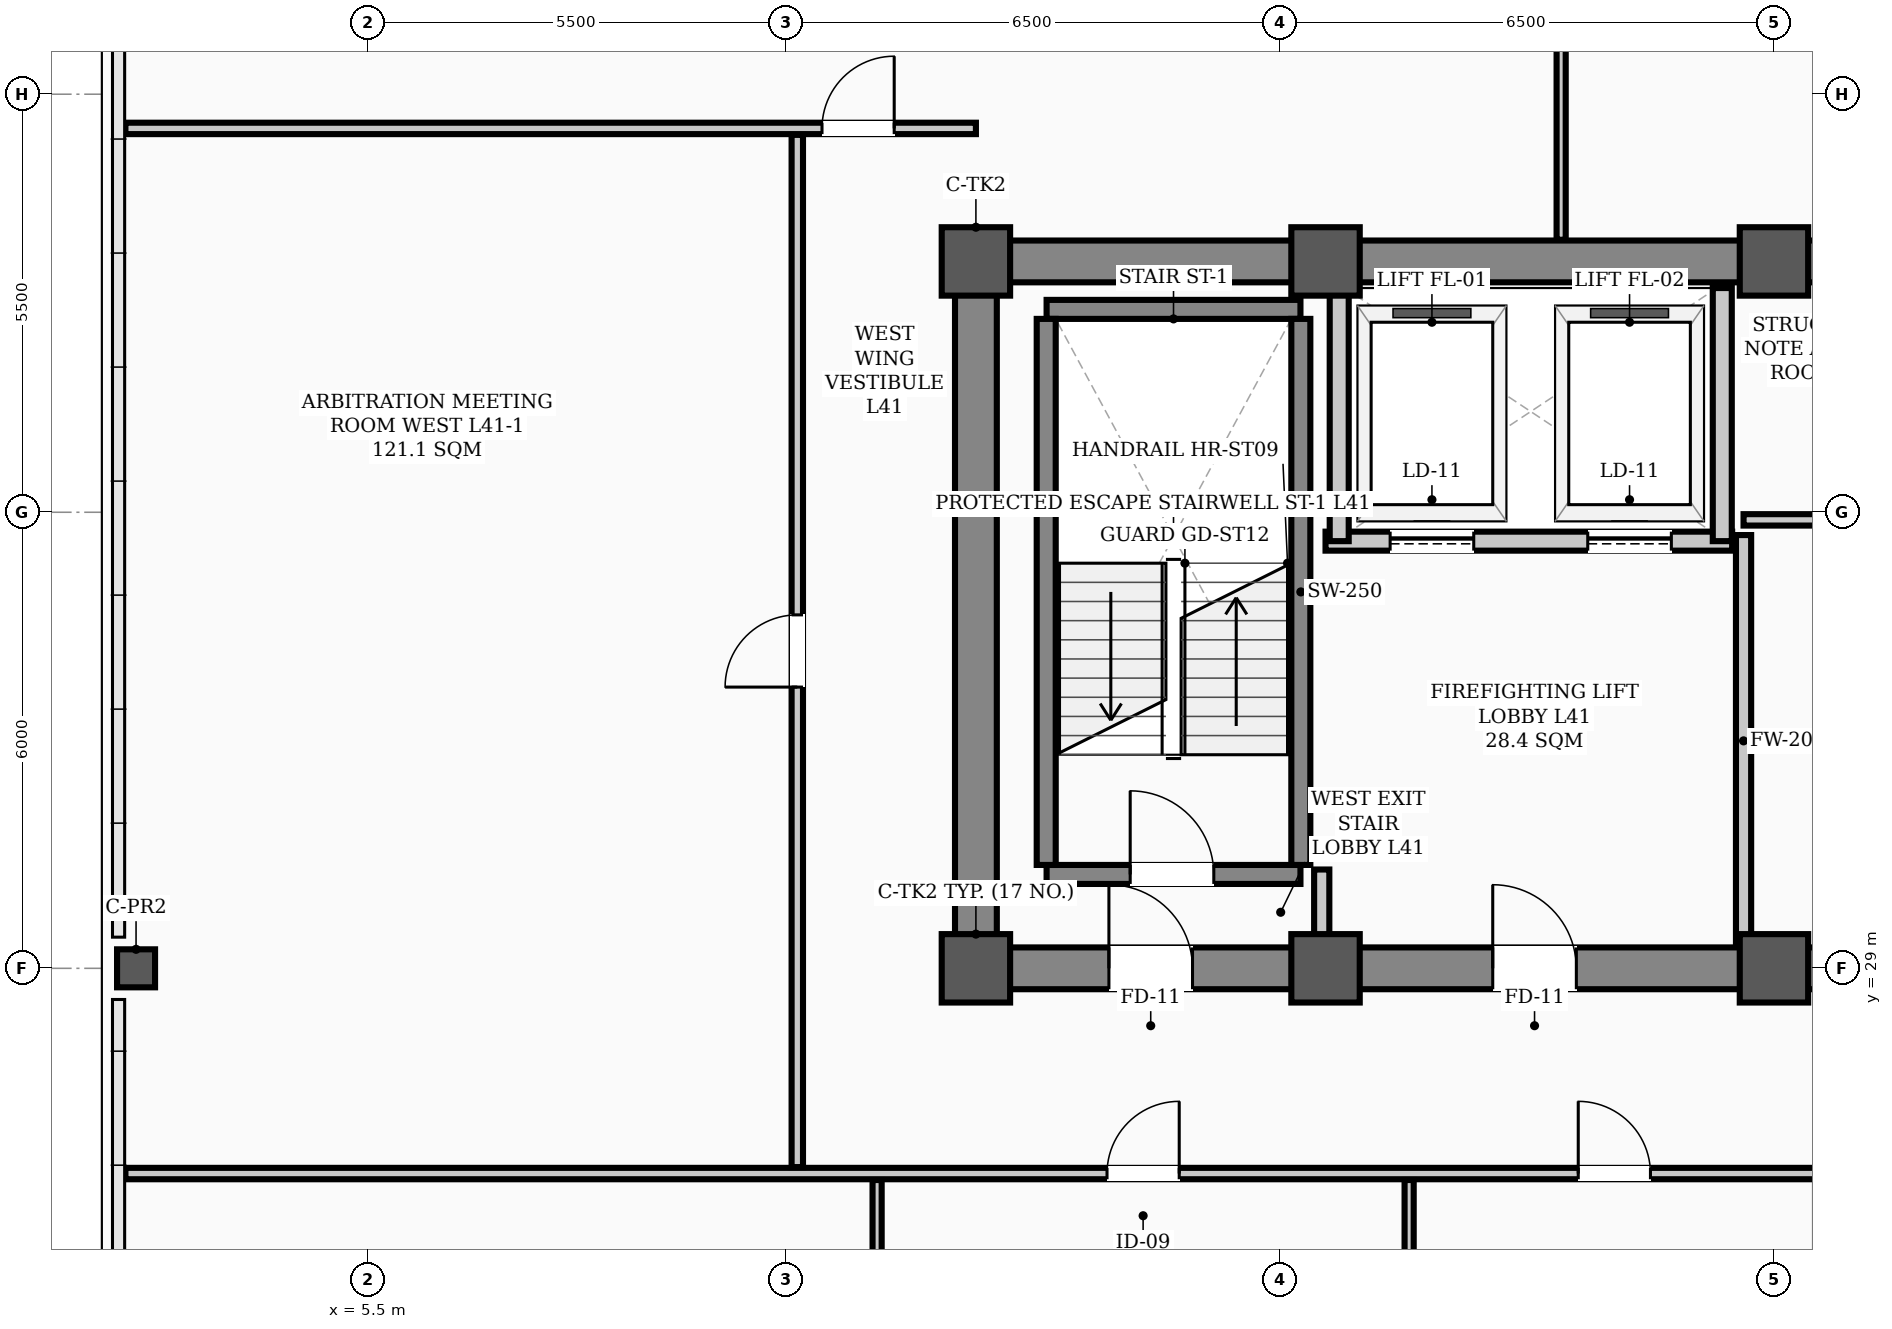
"""IFC4 building model, lengths in metres.
Left out: names, types, materials, properties, quantities, classifications, styles, units other than length and angle.
Written with IfcOpenShell. Run it as: python <this file> out.ifc"""

import sys

from ifc_helpers import new_model, si_unit, direction, frame, frame_2d, origin, origin_2d, place, context, subcontext, project, spatial, rectangle, hollow_rectangle, extrude, element, fill, save


model = new_model("IFC4")
c1 = context("Model", 3, precision=1e-05, world=origin(), true_north=direction((0.0, 1.0)))
c2 = subcontext(c1, "Body", "Model", "MODEL_VIEW")
j1 = project(units=[si_unit("LENGTHUNIT", "METRE"), si_unit("PLANEANGLEUNIT", "RADIAN")], contexts=[c1])
p1 = place(None, origin())
s1 = spatial("IfcSite", under=j1, at=p1, CompositionType="ELEMENT")
p2 = place(p1, origin())
s2 = spatial("IfcBuilding", under=s1, at=p2, CompositionType="ELEMENT")
p3 = place(p2, frame((0.0, 0.0, 165.6)))
s3 = spatial("IfcBuildingStorey", under=s2, at=p3, CompositionType="ELEMENT", Elevation=165.6)
for number, where, z_axis, x_axis in (
    (1, (13.5, 29.0, 0.0), (0.0, 0.0, 1.0), (1.0, 0.0, 0.0)),
    (2, (13.5, 38.3, 0.0), (0.0, 0.0, 1.0), (1.0, 0.0, 0.0)),
    (3, (18.1, 29.0, 0.0), (0.0, 0.0, 1.0), (1.0, 0.0, 0.0)),
    (4, (18.1, 38.3, 0.0), (0.0, 0.0, 1.0), (1.0, 0.0, 0.0)),
    (5, (24.0, 29.0, 0.0), (0.0, 0.0, 1.0), (1.0, 0.0, 0.0)),
    (6, (24.0, 38.3, 0.0), (0.0, 0.0, 1.0), (1.0, 0.0, 0.0)),
):
    element("IfcColumn", number, at=place(p3, frame(where, z_axis=z_axis, x_axis=x_axis)), inside=s3, PredefinedType="COLUMN", context=c2, shape_type="SweptSolid", body=[
        extrude(hollow_rectangle(XDim=0.9, YDim=0.9, WallThickness=0.035, InnerFilletRadius=0.017, OuterFilletRadius=0.052, at=origin_2d()), origin(), (0.0, 0.0, 1.0), 3.9),
    ])
p4 = place(p3, frame((2.45, 29.0, 0.0), z_axis=(0.0, 0.0, 1.0), x_axis=(1.0, 0.0, 0.0)))
e7 = element("IfcColumn", 7, at=p4, inside=s3, PredefinedType="COLUMN", context=c2, shape_type="SweptSolid", body=[
    extrude(hollow_rectangle(XDim=0.5, YDim=0.5, WallThickness=0.024, InnerFilletRadius=0.012, OuterFilletRadius=0.036, at=origin_2d()), origin(), (0.0, 0.0, 1.0), 3.66),
])
p5 = place(p3, frame((13.5, 29.0, 0.0), z_axis=(0.0, 0.0, 1.0), x_axis=(1.0, 0.0, 0.0)))
e8 = element("IfcWall", 8, at=p5, inside=s3, PredefinedType="SHEAR", context=c2, shape_type="SweptSolid", body=[
    extrude(rectangle(XDim=30.5, YDim=0.55, at=frame_2d((15.25, 0.0))), origin(), (0.0, 0.0, 1.0), 3.66),
])
p6 = place(p5, frame((1.75, 0.0, 0.0)))
e9 = element("IfcOpeningElement", 9, at=p6, cuts=e8, PredefinedType="OPENING", context=c2, shape_type="SweptSolid", body=[
    extrude(rectangle(XDim=1.1, YDim=2.08, at=frame_2d((0.55, 1.04))), frame((0.0, 0.285, 0.0), z_axis=(0.0, -1.0, 0.0), x_axis=(1.0, 0.0, 0.0)), (0.0, 0.0, 1.0), 0.57),
])
p7 = place(p5, frame((26.7, 0.0, 0.0)))
e10 = element("IfcOpeningElement", 10, at=p7, cuts=e8, PredefinedType="OPENING", context=c2, shape_type="SweptSolid", body=[
    extrude(rectangle(XDim=1.1, YDim=2.08, at=frame_2d((0.55, 1.04))), frame((0.0, 0.285, 0.0), z_axis=(0.0, -1.0, 0.0), x_axis=(1.0, 0.0, 0.0)), (0.0, 0.0, 1.0), 0.57),
])
p8 = place(p5, frame((6.8, 0.0, 0.0)))
e11 = element("IfcOpeningElement", 11, at=p8, cuts=e8, PredefinedType="OPENING", context=c2, shape_type="SweptSolid", body=[
    extrude(rectangle(XDim=1.1, YDim=2.08, at=frame_2d((0.55, 1.04))), frame((0.0, 0.285, 0.0), z_axis=(0.0, -1.0, 0.0), x_axis=(1.0, 0.0, 0.0)), (0.0, 0.0, 1.0), 0.57),
])
p9 = place(p5, frame((13.2, 0.0, 0.0)))
e12 = element("IfcOpeningElement", 12, at=p9, cuts=e8, PredefinedType="OPENING", context=c2, shape_type="SweptSolid", body=[
    extrude(rectangle(XDim=1.6, YDim=2.08, at=frame_2d((0.8, 1.04))), frame((0.0, 0.285, 0.0), z_axis=(0.0, -1.0, 0.0), x_axis=(1.0, 0.0, 0.0)), (0.0, 0.0, 1.0), 0.57),
])
p10 = place(p5, frame((19.5, 0.0, 0.0)))
e13 = element("IfcOpeningElement", 13, at=p10, cuts=e8, PredefinedType="OPENING", context=c2, shape_type="SweptSolid", body=[
    extrude(rectangle(XDim=0.9, YDim=2.08, at=frame_2d((0.45, 1.04))), frame((0.0, 0.285, 0.0), z_axis=(0.0, -1.0, 0.0), x_axis=(1.0, 0.0, 0.0)), (0.0, 0.0, 1.0), 0.57),
])
p11 = place(p5, frame((21.55, 0.0, 0.0)))
e14 = element("IfcOpeningElement", 14, at=p11, cuts=e8, PredefinedType="OPENING", context=c2, shape_type="SweptSolid", body=[
    extrude(rectangle(XDim=0.9, YDim=2.08, at=frame_2d((0.45, 1.04))), frame((0.0, 0.285, 0.0), z_axis=(0.0, -1.0, 0.0), x_axis=(1.0, 0.0, 0.0)), (0.0, 0.0, 1.0), 0.57),
])
p12 = place(p3, frame((13.5, 38.3, 0.0), z_axis=(0.0, 0.0, 1.0), x_axis=(1.0, 0.0, 0.0)))
e15 = element("IfcWall", 15, at=p12, inside=s3, PredefinedType="SHEAR", context=c2, shape_type="SweptSolid", body=[
    extrude(rectangle(XDim=30.5, YDim=0.55, at=frame_2d((15.25, 0.0))), origin(), (0.0, 0.0, 1.0), 3.66),
])
p13 = place(p3, frame((13.5, 29.35, 0.0), z_axis=(0.0, 0.0, 1.0), x_axis=(0.0, 1.0, 0.0)))
e16 = element("IfcWall", 16, at=p13, inside=s3, PredefinedType="SHEAR", context=c2, shape_type="SweptSolid", body=[
    extrude(rectangle(XDim=8.6, YDim=0.55, at=frame_2d((4.3, 0.0))), origin(), (0.0, 0.0, 1.0), 3.66),
])
p14 = place(p3, frame((14.43, 30.235, 0.0), z_axis=(0.0, 0.0, 1.0), x_axis=(1.0, 0.0, 0.0)))
e17 = element("IfcWall", 17, at=p14, inside=s3, PredefinedType="STANDARD", context=c2, shape_type="SweptSolid", body=[
    extrude(rectangle(XDim=3.34, YDim=0.25, at=frame_2d((1.67, 0.0))), origin(), (0.0, 0.0, 1.0), 3.66),
])
p15 = place(p14, frame((1.1, 0.0, 0.0)))
e18 = element("IfcOpeningElement", 18, at=p15, cuts=e17, PredefinedType="OPENING", context=c2, shape_type="SweptSolid", body=[
    extrude(rectangle(XDim=1.1, YDim=2.08, at=frame_2d((0.55, 1.04))), frame((0.0, 0.135, 0.0), z_axis=(0.0, -1.0, 0.0), x_axis=(1.0, 0.0, 0.0)), (0.0, 0.0, 1.0), 0.27),
])
p16 = place(p3, frame((14.43, 37.669, 0.0), z_axis=(0.0, 0.0, 1.0), x_axis=(1.0, 0.0, 0.0)))
e19 = element("IfcWall", 19, at=p16, inside=s3, PredefinedType="STANDARD", context=c2, shape_type="SweptSolid", body=[
    extrude(rectangle(XDim=3.34, YDim=0.25, at=frame_2d((1.67, 0.0))), origin(), (0.0, 0.0, 1.0), 3.66),
])
for number, where, z_axis, x_axis in (
    (20, (14.425, 30.36, 0.0), (0.0, 0.0, 1.0), (0.0, 1.0, 0.0)),
    (21, (17.775, 30.36, 0.0), (0.0, 0.0, 1.0), (0.0, 1.0, 0.0)),
):
    element("IfcWall", number, at=place(p3, frame(where, z_axis=z_axis, x_axis=x_axis)), inside=s3, PredefinedType="STANDARD", context=c2, shape_type="SweptSolid", body=[
        extrude(rectangle(XDim=7.184, YDim=0.25, at=frame_2d((3.592, 0.0))), origin(), (0.0, 0.0, 1.0), 3.66),
    ])
p17 = place(p3, frame((18.1, 34.62, 0.0), z_axis=(0.0, 0.0, 1.0), x_axis=(1.0, 0.0, 0.0)))
e22 = element("IfcWall", 22, at=p17, inside=s3, PredefinedType="STANDARD", context=c2, shape_type="SweptSolid", body=[
    extrude(rectangle(XDim=5.35, YDim=0.25, at=frame_2d((2.675, 0.0))), origin(), (0.0, 0.0, 1.0), 3.66),
])
p18 = place(p17, frame((0.85, 0.0, 0.0)))
e23 = element("IfcOpeningElement", 23, at=p18, cuts=e22, PredefinedType="OPENING", context=c2, shape_type="SweptSolid", body=[
    extrude(rectangle(XDim=1.1, YDim=2.08, at=frame_2d((0.55, 1.04))), frame((0.0, 0.135, 0.0), z_axis=(0.0, -1.0, 0.0), x_axis=(1.0, 0.0, 0.0)), (0.0, 0.0, 1.0), 0.27),
])
p19 = place(p17, frame((3.45, 0.0, 0.0)))
e24 = element("IfcOpeningElement", 24, at=p19, cuts=e22, PredefinedType="OPENING", context=c2, shape_type="SweptSolid", body=[
    extrude(rectangle(XDim=1.1, YDim=2.08, at=frame_2d((0.55, 1.04))), frame((0.0, 0.135, 0.0), z_axis=(0.0, -1.0, 0.0), x_axis=(1.0, 0.0, 0.0)), (0.0, 0.0, 1.0), 0.27),
])
for number, where, z_axis, x_axis in (
    (25, (18.28, 34.62, 0.0), (0.0, 0.0, 1.0), (0.0, 1.0, 0.0)),
    (26, (23.32, 34.62, 0.0), (0.0, 0.0, 1.0), (0.0, 1.0, 0.0)),
):
    element("IfcWall", number, at=place(p3, frame(where, z_axis=z_axis, x_axis=x_axis)), inside=s3, PredefinedType="STANDARD", context=c2, shape_type="SweptSolid", body=[
        extrude(rectangle(XDim=3.33, YDim=0.25, at=frame_2d((1.665, 0.0))), origin(), (0.0, 0.0, 1.0), 2.24),
    ])
p20 = place(p3, frame((23.6, 34.9, 0.0), z_axis=(0.0, 0.0, 1.0), x_axis=(1.0, 0.0, 0.0)))
e27 = element("IfcWall", 27, at=p20, inside=s3, PredefinedType="PARTITIONING", context=c2, shape_type="SweptSolid", body=[
    extrude(rectangle(XDim=4.58, YDim=0.15, at=frame_2d((2.29, 0.0))), origin(), (0.0, 0.0, 1.0), 3.66),
])
p21 = place(p20, frame((1.875, 0.0, 0.0)))
e28 = element("IfcOpeningElement", 28, at=p21, cuts=e27, PredefinedType="OPENING", context=c2, shape_type="SweptSolid", body=[
    extrude(rectangle(XDim=0.95, YDim=2.08, at=frame_2d((0.475, 1.04))), frame((0.0, 0.085, 0.0), z_axis=(0.0, -1.0, 0.0), x_axis=(1.0, 0.0, 0.0)), (0.0, 0.0, 1.0), 0.17),
])
p22 = place(p3, frame((2.31, 26.3, 0.0), z_axis=(0.0, 0.0, 1.0), x_axis=(1.0, 0.0, 0.0)))
e29 = element("IfcWall", 29, at=p22, inside=s3, PredefinedType="PARTITIONING", context=c2, shape_type="SweptSolid", body=[
    extrude(rectangle(XDim=46.38, YDim=0.15, at=frame_2d((23.19, 0.0))), origin(), (0.0, 0.0, 1.0), 2.24),
])
p23 = place(p22, frame((12.915, 0.0, 0.0)))
e30 = element("IfcOpeningElement", 30, at=p23, cuts=e29, PredefinedType="OPENING", context=c2, shape_type="SweptSolid", body=[
    extrude(rectangle(XDim=0.95, YDim=2.08, at=frame_2d((0.475, 1.04))), frame((0.0, 0.085, 0.0), z_axis=(0.0, -1.0, 0.0), x_axis=(1.0, 0.0, 0.0)), (0.0, 0.0, 1.0), 0.17),
])
p24 = place(p22, frame((19.115, 0.0, 0.0)))
e31 = element("IfcOpeningElement", 31, at=p24, cuts=e29, PredefinedType="OPENING", context=c2, shape_type="SweptSolid", body=[
    extrude(rectangle(XDim=0.95, YDim=2.08, at=frame_2d((0.475, 1.04))), frame((0.0, 0.085, 0.0), z_axis=(0.0, -1.0, 0.0), x_axis=(1.0, 0.0, 0.0)), (0.0, 0.0, 1.0), 0.17),
])
p25 = place(p22, frame((25.915, 0.0, 0.0)))
e32 = element("IfcOpeningElement", 32, at=p25, cuts=e29, PredefinedType="OPENING", context=c2, shape_type="SweptSolid", body=[
    extrude(rectangle(XDim=0.95, YDim=2.08, at=frame_2d((0.475, 1.04))), frame((0.0, 0.085, 0.0), z_axis=(0.0, -1.0, 0.0), x_axis=(1.0, 0.0, 0.0)), (0.0, 0.0, 1.0), 0.17),
])
p26 = place(p22, frame((36.515, 0.0, 0.0)))
e33 = element("IfcOpeningElement", 33, at=p26, cuts=e29, PredefinedType="OPENING", context=c2, shape_type="SweptSolid", body=[
    extrude(rectangle(XDim=0.95, YDim=2.08, at=frame_2d((0.475, 1.04))), frame((0.0, 0.085, 0.0), z_axis=(0.0, -1.0, 0.0), x_axis=(1.0, 0.0, 0.0)), (0.0, 0.0, 1.0), 0.17),
])
p27 = place(p22, frame((43.56, 0.0, 0.0)))
e34 = element("IfcOpeningElement", 34, at=p27, cuts=e29, PredefinedType="OPENING", context=c2, shape_type="SweptSolid", body=[
    extrude(rectangle(XDim=0.95, YDim=2.08, at=frame_2d((0.475, 1.04))), frame((0.0, 0.085, 0.0), z_axis=(0.0, -1.0, 0.0), x_axis=(1.0, 0.0, 0.0)), (0.0, 0.0, 1.0), 0.17),
])
p28 = place(p3, frame((2.31, 40.05, 0.0), z_axis=(0.0, 0.0, 1.0), x_axis=(1.0, 0.0, 0.0)))
e35 = element("IfcWall", 35, at=p28, inside=s3, PredefinedType="PARTITIONING", context=c2, shape_type="SweptSolid", body=[
    extrude(rectangle(XDim=11.19, YDim=0.15, at=frame_2d((5.595, 0.0))), origin(), (0.0, 0.0, 1.0), 2.24),
])
p29 = place(p28, frame((9.165, 0.0, 0.0)))
e36 = element("IfcOpeningElement", 36, at=p29, cuts=e35, PredefinedType="OPENING", context=c2, shape_type="SweptSolid", body=[
    extrude(rectangle(XDim=0.95, YDim=2.08, at=frame_2d((0.475, 1.04))), frame((0.0, 0.085, 0.0), z_axis=(0.0, -1.0, 0.0), x_axis=(1.0, 0.0, 0.0)), (0.0, 0.0, 1.0), 0.17),
])
p30 = place(p3, frame((18.05, 29.285, 0.0), z_axis=(0.0, 0.0, 1.0), x_axis=(0.0, 1.0, 0.0)))
e37 = element("IfcWall", 37, at=p30, inside=s3, PredefinedType="STANDARD", context=c2, shape_type="SweptSolid", body=[
    extrude(rectangle(XDim=1.015, YDim=0.2, at=frame_2d((0.508, 0.0))), origin(), (0.0, 0.0, 1.0), 2.24),
])
p31 = place(p3, frame((23.6, 29.285, 0.0), z_axis=(0.0, 0.0, 1.0), x_axis=(0.0, 1.0, 0.0)))
e38 = element("IfcWall", 38, at=p31, inside=s3, PredefinedType="STANDARD", context=c2, shape_type="SweptSolid", body=[
    extrude(rectangle(XDim=5.415, YDim=0.2, at=frame_2d((2.708, 0.0))), origin(), (0.0, 0.0, 1.0), 2.24),
])
p32 = place(p3, frame((11.15, 26.385, 0.0), z_axis=(0.0, 0.0, 1.0), x_axis=(0.0, 1.0, 0.0)))
e39 = element("IfcWall", 39, at=p32, inside=s3, PredefinedType="PARTITIONING", context=c2, shape_type="SweptSolid", body=[
    extrude(rectangle(XDim=13.58, YDim=0.15, at=frame_2d((6.79, 0.0))), origin(), (0.0, 0.0, 1.0), 2.24),
])
p33 = place(p32, frame((6.315, 0.0, 0.0)))
e40 = element("IfcOpeningElement", 40, at=p33, cuts=e39, PredefinedType="OPENING", context=c2, shape_type="SweptSolid", body=[
    extrude(rectangle(XDim=0.95, YDim=2.08, at=frame_2d((0.475, 1.04))), frame((0.0, 0.085, 0.0), z_axis=(0.0, -1.0, 0.0), x_axis=(1.0, 0.0, 0.0)), (0.0, 0.0, 1.0), 0.17),
])
p34 = place(p3, frame((12.2, 16.31, 0.0), z_axis=(0.0, 0.0, 1.0), x_axis=(0.0, 1.0, 0.0)))
e41 = element("IfcWall", 41, at=p34, inside=s3, PredefinedType="PARTITIONING", context=c2, shape_type="SweptSolid", body=[
    extrude(rectangle(XDim=9.905, YDim=0.12, at=frame_2d((4.953, 0.0))), origin(), (0.0, 0.0, 1.0), 2.24),
])
p35 = place(p34, frame((7.915, 0.0, 0.0)))
e42 = element("IfcOpeningElement", 42, at=p35, cuts=e41, PredefinedType="OPENING", context=c2, shape_type="SweptSolid", body=[
    extrude(rectangle(XDim=0.95, YDim=2.08, at=frame_2d((0.475, 1.04))), frame((0.0, 0.07, 0.0), z_axis=(0.0, -1.0, 0.0), x_axis=(1.0, 0.0, 0.0)), (0.0, 0.0, 1.0), 0.14),
])
p36 = place(p3, frame((19.2, 16.31, 0.0), z_axis=(0.0, 0.0, 1.0), x_axis=(0.0, 1.0, 0.0)))
e43 = element("IfcWall", 43, at=p36, inside=s3, PredefinedType="PARTITIONING", context=c2, shape_type="SweptSolid", body=[
    extrude(rectangle(XDim=9.905, YDim=0.12, at=frame_2d((4.953, 0.0))), origin(), (0.0, 0.0, 1.0), 2.24),
])
p37 = place(p3, frame((21.2, 38.585, 0.0), z_axis=(0.0, 0.0, 1.0), x_axis=(0.0, 1.0, 0.0)))
e44 = element("IfcWall", 44, at=p37, inside=s3, PredefinedType="PARTITIONING", context=c2, shape_type="SweptSolid", body=[
    extrude(rectangle(XDim=7.105, YDim=0.12, at=frame_2d((3.552, 0.0))), origin(), (0.0, 0.0, 1.0), 2.24),
])
p38 = place(p37, frame((3.81, 0.0, 0.0)))
e45 = element("IfcOpeningElement", 45, at=p38, cuts=e44, PredefinedType="OPENING", context=c2, shape_type="SweptSolid", body=[
    extrude(rectangle(XDim=0.95, YDim=2.08, at=frame_2d((0.475, 1.04))), frame((0.0, 0.07, 0.0), z_axis=(0.0, -1.0, 0.0), x_axis=(1.0, 0.0, 0.0)), (0.0, 0.0, 1.0), 0.14),
])
p39 = place(p15, origin())
e46 = element("IfcDoor", 46, at=p39, inside=s3, OperationType="SINGLE_SWING_LEFT", PredefinedType="DOOR", context=c2, shape_type="SweptSolid", body=[
    extrude(rectangle(XDim=1.1, YDim=2.08, at=frame_2d((0.55, 1.04))), frame((0.0, 0.025, 0.0), z_axis=(0.0, -1.0, 0.0), x_axis=(1.0, 0.0, 0.0)), (0.0, 0.0, 1.0), 0.05),
])
fill(e18, e46)
p40 = place(p6, origin())
e47 = element("IfcDoor", 47, at=p40, inside=s3, OperationType="SINGLE_SWING_LEFT", PredefinedType="DOOR", context=c2, shape_type="SweptSolid", body=[
    extrude(rectangle(XDim=1.1, YDim=2.08, at=frame_2d((0.55, 1.04))), frame((0.0, 0.025, 0.0), z_axis=(0.0, -1.0, 0.0), x_axis=(1.0, 0.0, 0.0)), (0.0, 0.0, 1.0), 0.05),
])
fill(e9, e47)
p41 = place(p8, origin())
e48 = element("IfcDoor", 48, at=p41, inside=s3, OperationType="SINGLE_SWING_LEFT", PredefinedType="DOOR", context=c2, shape_type="SweptSolid", body=[
    extrude(rectangle(XDim=1.1, YDim=2.08, at=frame_2d((0.55, 1.04))), frame((0.0, 0.025, 0.0), z_axis=(0.0, -1.0, 0.0), x_axis=(1.0, 0.0, 0.0)), (0.0, 0.0, 1.0), 0.05),
])
fill(e11, e48)
p42 = place(p23, origin())
e49 = element("IfcDoor", 49, at=p42, inside=s3, OperationType="SINGLE_SWING_RIGHT", PredefinedType="DOOR", context=c2, shape_type="SweptSolid", body=[
    extrude(rectangle(XDim=0.95, YDim=2.08, at=frame_2d((0.475, 1.04))), frame((0.0, 0.025, 0.0), z_axis=(0.0, -1.0, 0.0), x_axis=(1.0, 0.0, 0.0)), (0.0, 0.0, 1.0), 0.05),
])
fill(e30, e49)
p43 = place(p24, origin())
e50 = element("IfcDoor", 50, at=p43, inside=s3, OperationType="SINGLE_SWING_LEFT", PredefinedType="DOOR", context=c2, shape_type="SweptSolid", body=[
    extrude(rectangle(XDim=0.95, YDim=2.08, at=frame_2d((0.475, 1.04))), frame((0.0, 0.025, 0.0), z_axis=(0.0, -1.0, 0.0), x_axis=(1.0, 0.0, 0.0)), (0.0, 0.0, 1.0), 0.05),
])
fill(e31, e50)
p44 = place(p33, origin())
e51 = element("IfcDoor", 51, at=p44, inside=s3, OperationType="SINGLE_SWING_LEFT", PredefinedType="DOOR", context=c2, shape_type="SweptSolid", body=[
    extrude(rectangle(XDim=0.95, YDim=2.08, at=frame_2d((0.475, 1.04))), frame((0.0, 0.025, 0.0), z_axis=(0.0, -1.0, 0.0), x_axis=(1.0, 0.0, 0.0)), (0.0, 0.0, 1.0), 0.05),
])
fill(e40, e51)
p45 = place(p29, origin())
e52 = element("IfcDoor", 52, at=p45, inside=s3, OperationType="SINGLE_SWING_RIGHT", PredefinedType="DOOR", context=c2, shape_type="SweptSolid", body=[
    extrude(rectangle(XDim=0.95, YDim=2.08, at=frame_2d((0.475, 1.04))), frame((0.0, 0.025, 0.0), z_axis=(0.0, -1.0, 0.0), x_axis=(1.0, 0.0, 0.0)), (0.0, 0.0, 1.0), 0.05),
])
fill(e36, e52)
p46 = place(p18, origin())
e53 = element("IfcDoor", 53, at=p46, inside=s3, OperationType="SLIDING_TO_LEFT", PredefinedType="DOOR", context=c2, shape_type="SweptSolid", body=[
    extrude(rectangle(XDim=1.1, YDim=2.08, at=frame_2d((0.55, 1.04))), frame((0.0, 0.025, 0.0), z_axis=(0.0, -1.0, 0.0), x_axis=(1.0, 0.0, 0.0)), (0.0, 0.0, 1.0), 0.05),
])
fill(e23, e53)
p47 = place(p19, origin())
e54 = element("IfcDoor", 54, at=p47, inside=s3, OperationType="SLIDING_TO_LEFT", PredefinedType="DOOR", context=c2, shape_type="SweptSolid", body=[
    extrude(rectangle(XDim=1.1, YDim=2.08, at=frame_2d((0.55, 1.04))), frame((0.0, 0.025, 0.0), z_axis=(0.0, -1.0, 0.0), x_axis=(1.0, 0.0, 0.0)), (0.0, 0.0, 1.0), 0.05),
])
fill(e24, e54)
save(model, sys.argv[1])
